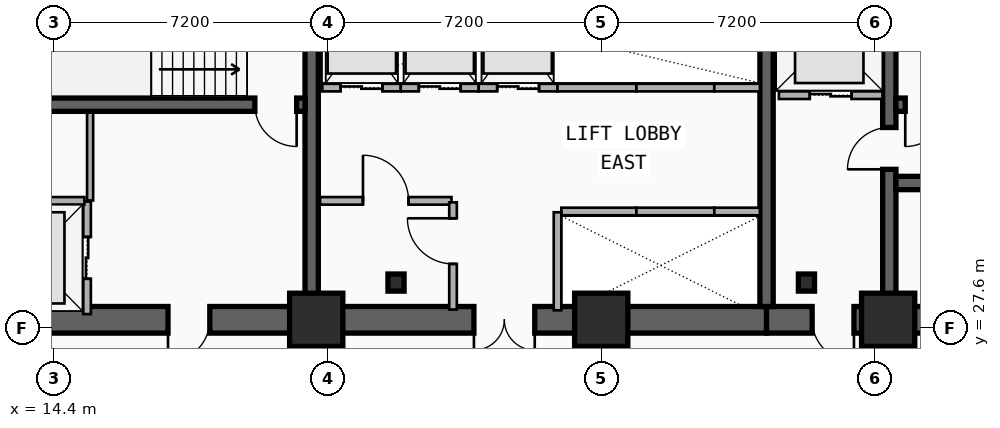
"""IFC4 building model, lengths in metres.
Left out: names, types, materials, properties, quantities, classifications, styles, units other than length and angle.
Written with IfcOpenShell. Run it as: python <this file> out.ifc"""

import sys

from ifc_helpers import new_model, si_unit, direction, frame, frame_2d, origin, origin_2d, place, context, subcontext, project, spatial, rectangle, i_section, extrude, element, fill, save


model = new_model("IFC4")
c1 = context("Model", 3, precision=1e-05, world=origin(), true_north=direction((0.0, 1.0)))
c2 = subcontext(c1, "Body", "Model", "MODEL_VIEW")
j1 = project(units=[si_unit("LENGTHUNIT", "METRE"), si_unit("PLANEANGLEUNIT", "RADIAN")], contexts=[c1])
p1 = place(None, origin())
s1 = spatial("IfcSite", under=j1, at=p1, CompositionType="ELEMENT")
p2 = place(p1, origin())
s2 = spatial("IfcBuilding", under=s1, at=p2, CompositionType="ELEMENT")
p3 = place(p2, frame((0.0, 0.0, 60.5)))
s3 = spatial("IfcBuildingStorey", under=s2, at=p3, CompositionType="ELEMENT", Elevation=60.5)
p4 = place(p3, frame((21.18, 27.82, 0.0), z_axis=(0.0, 0.0, 1.0), x_axis=(-1.0, 0.0, 0.0)))
e1 = element("IfcWall", 1, at=p4, inside=s3, PredefinedType="SHEAR", context=c2, shape_type="SweptSolid", body=[
    extrude(rectangle(XDim=9.03, YDim=0.7, at=frame_2d((4.515, 0.0))), origin(), (0.0, 0.0, 1.0), 3.5),
])
p5 = place(p4, frame((2.68, 0.0, 0.0)))
e2 = element("IfcOpeningElement", 2, at=p5, cuts=e1, PredefinedType="OPENING", context=c2, shape_type="SweptSolid", body=[
    extrude(rectangle(XDim=1.1, YDim=2.15, at=frame_2d((0.55, 1.075))), frame((0.0, 0.36, 0.0), z_axis=(0.0, -1.0, 0.0), x_axis=(1.0, 0.0, 0.0)), (0.0, 0.0, 1.0), 0.72),
])
p6 = place(p3, frame((33.15, 27.82, 0.0), z_axis=(0.0, 0.0, 1.0), x_axis=(-1.0, 0.0, 0.0)))
e3 = element("IfcWall", 3, at=p6, inside=s3, PredefinedType="SHEAR", context=c2, shape_type="SweptSolid", body=[
    extrude(rectangle(XDim=11.97, YDim=0.7, at=frame_2d((5.985, 0.0))), origin(), (0.0, 0.0, 1.0), 3.5),
])
p7 = place(p6, frame((6.1, 0.0, 0.0)))
e4 = element("IfcOpeningElement", 4, at=p7, cuts=e3, PredefinedType="OPENING", context=c2, shape_type="SweptSolid", body=[
    extrude(rectangle(XDim=1.6, YDim=2.2, at=frame_2d((0.8, 1.1))), frame((0.0, 0.36, 0.0), z_axis=(0.0, -1.0, 0.0), x_axis=(1.0, 0.0, 0.0)), (0.0, 0.0, 1.0), 0.72),
])
p8 = place(p3, frame((45.38, 27.82, 0.0), z_axis=(0.0, 0.0, 1.0), x_axis=(-1.0, 0.0, 0.0)))
e5 = element("IfcWall", 5, at=p8, inside=s3, PredefinedType="SHEAR", context=c2, shape_type="SweptSolid", body=[
    extrude(rectangle(XDim=12.23, YDim=0.7, at=frame_2d((6.115, 0.0))), origin(), (0.0, 0.0, 1.0), 3.5),
])
p9 = place(p8, frame((9.93, 0.0, 0.0)))
e6 = element("IfcOpeningElement", 6, at=p9, cuts=e5, PredefinedType="OPENING", context=c2, shape_type="SweptSolid", body=[
    extrude(rectangle(XDim=1.1, YDim=2.15, at=frame_2d((0.55, 1.075))), frame((0.0, 0.36, 0.0), z_axis=(0.0, -1.0, 0.0), x_axis=(1.0, 0.0, 0.0)), (0.0, 0.0, 1.0), 0.72),
])
p10 = place(p8, frame((6.23, 0.0, 0.0)))
e7 = element("IfcOpeningElement", 7, at=p10, cuts=e5, PredefinedType="OPENING", context=c2, shape_type="SweptSolid", body=[
    extrude(rectangle(XDim=1.1, YDim=2.15, at=frame_2d((0.55, 1.075))), frame((0.0, 0.36, 0.0), z_axis=(0.0, -1.0, 0.0), x_axis=(1.0, 0.0, 0.0)), (0.0, 0.0, 1.0), 0.72),
])
for number, where, z_axis, x_axis in (
    (8, (21.18, 28.17, 0.0), (0.0, 0.0, 1.0), (0.0, 1.0, 0.0)),
    (9, (33.15, 28.17, 0.0), (0.0, 0.0, 1.0), (0.0, 1.0, 0.0)),
):
    element("IfcWall", number, at=place(p3, frame(where, z_axis=z_axis, x_axis=x_axis)), inside=s3, PredefinedType="SHEAR", context=c2, shape_type="SweptSolid", body=[
        extrude(rectangle(XDim=8.53, YDim=0.35, at=frame_2d((4.265, 0.0))), origin(), (0.0, 0.0, 1.0), 3.5),
    ])
p11 = place(p3, frame((36.38, 28.17, 0.0), z_axis=(0.0, 0.0, 1.0), x_axis=(0.0, 1.0, 0.0)))
e10 = element("IfcWall", 10, at=p11, inside=s3, PredefinedType="SHEAR", context=c2, shape_type="SweptSolid", body=[
    extrude(rectangle(XDim=8.53, YDim=0.35, at=frame_2d((4.265, 0.0))), origin(), (0.0, 0.0, 1.0), 3.5),
])
p12 = place(p11, frame((3.61, 0.0, 0.0)))
e11 = element("IfcOpeningElement", 11, at=p12, cuts=e10, PredefinedType="OPENING", context=c2, shape_type="SweptSolid", body=[
    extrude(rectangle(XDim=1.1, YDim=2.15, at=frame_2d((0.55, 1.075))), frame((0.0, 0.185, 0.0), z_axis=(0.0, -1.0, 0.0), x_axis=(1.0, 0.0, 0.0)), (0.0, 0.0, 1.0), 0.37),
])
p13 = place(p3, frame((21.005, 33.48, 0.0), z_axis=(0.0, 0.0, 1.0), x_axis=(-1.0, 0.0, 0.0)))
e12 = element("IfcWall", 12, at=p13, inside=s3, PredefinedType="SHEAR", context=c2, shape_type="SweptSolid", body=[
    extrude(rectangle(XDim=8.505, YDim=0.35, at=frame_2d((4.252, 0.0))), origin(), (0.0, 0.0, 1.0), 3.5),
])
p14 = place(p13, frame((0.22, 0.0, 0.0)))
e13 = element("IfcOpeningElement", 13, at=p14, cuts=e12, PredefinedType="OPENING", context=c2, shape_type="SweptSolid", body=[
    extrude(rectangle(XDim=1.1, YDim=2.15, at=frame_2d((0.55, 1.075))), frame((0.0, 0.185, 0.0), z_axis=(0.0, -1.0, 0.0), x_axis=(1.0, 0.0, 0.0)), (0.0, 0.0, 1.0), 0.37),
])
p15 = place(p3, frame((45.03, 33.48, 0.0), z_axis=(0.0, 0.0, 1.0), x_axis=(-1.0, 0.0, 0.0)))
e14 = element("IfcWall", 14, at=p15, inside=s3, PredefinedType="SHEAR", context=c2, shape_type="SweptSolid", body=[
    extrude(rectangle(XDim=8.475, YDim=0.35, at=frame_2d((4.238, 0.0))), origin(), (0.0, 0.0, 1.0), 3.5),
])
p16 = place(p15, frame((7.13, 0.0, 0.0)))
e15 = element("IfcOpeningElement", 15, at=p16, cuts=e14, PredefinedType="OPENING", context=c2, shape_type="SweptSolid", body=[
    extrude(rectangle(XDim=1.1, YDim=2.15, at=frame_2d((0.55, 1.075))), frame((0.0, 0.185, 0.0), z_axis=(0.0, -1.0, 0.0), x_axis=(1.0, 0.0, 0.0)), (0.0, 0.0, 1.0), 0.37),
])
p17 = place(p3, frame((36.555, 31.42, 0.0), z_axis=(0.0, 0.0, 1.0), x_axis=(1.0, 0.0, 0.0)))
e16 = element("IfcWall", 16, at=p17, inside=s3, PredefinedType="SHEAR", context=c2, shape_type="SweptSolid", body=[
    extrude(rectangle(XDim=8.475, YDim=0.35, at=frame_2d((4.238, 0.0))), origin(), (0.0, 0.0, 1.0), 3.5),
])
for number, where, z_axis, x_axis in (
    (17, (23.4, 28.8, 0.0), (0.0, 0.0, 1.0), (1.0, 0.0, 0.0)),
    (18, (34.2, 28.8, 0.0), (0.0, 0.0, 1.0), (1.0, 0.0, 0.0)),
):
    element("IfcColumn", number, at=place(p3, frame(where, z_axis=z_axis, x_axis=x_axis)), inside=s3, PredefinedType="COLUMN", context=c2, shape_type="SweptSolid", body=[
        extrude(i_section(OverallWidth=0.424, OverallDepth=0.45, WebThickness=0.041, FlangeThickness=0.065, FilletRadius=0.015, at=origin_2d()), origin(), (0.0, 0.0, 1.0), 3.5),
    ])
for number, where, z_axis, x_axis in (
    (19, (21.3, 27.82, 0.0), (0.0, 0.0, 1.0), (1.0, 0.0, 0.0)),
    (20, (28.8, 27.82, 0.0), (0.0, 0.0, 1.0), (1.0, 0.0, 0.0)),
    (21, (36.35, 27.82, 0.0), (0.0, 0.0, 1.0), (1.0, 0.0, 0.0)),
):
    element("IfcColumn", number, at=place(p3, frame(where, z_axis=z_axis, x_axis=x_axis)), inside=s3, PredefinedType="COLUMN", context=c2, shape_type="SweptSolid", body=[
        extrude(rectangle(XDim=1.4, YDim=1.4, at=origin_2d()), origin(), (0.0, 0.0, 1.0), 3.5),
    ])
p18 = place(p3, frame((15.27, 27.97, 0.0), z_axis=(0.0, 0.0, 1.0), x_axis=(0.0, 1.0, 0.0)))
e22 = element("IfcWall", 22, at=p18, inside=s3, PredefinedType="PARTITIONING", context=c2, shape_type="SweptSolid", body=[
    extrude(rectangle(XDim=2.96, YDim=0.2, at=frame_2d((1.48, 0.0))), origin(), (0.0, 0.0, 1.0), 2.212),
])
p19 = place(p18, frame((0.93, 0.0, 0.0)))
e23 = element("IfcOpeningElement", 23, at=p19, cuts=e22, PredefinedType="OPENING", context=c2, shape_type="SweptSolid", body=[
    extrude(rectangle(XDim=1.1, YDim=2.15, at=frame_2d((0.55, 1.075))), frame((0.0, 0.11, 0.0), z_axis=(0.0, -1.0, 0.0), x_axis=(1.0, 0.0, 0.0)), (0.0, 0.0, 1.0), 0.22),
])
p20 = place(p3, frame((12.45, 30.95, 0.0), z_axis=(0.0, 0.0, 1.0), x_axis=(1.0, 0.0, 0.0)))
e24 = element("IfcWall", 24, at=p20, inside=s3, PredefinedType="PARTITIONING", context=c2, shape_type="SweptSolid", body=[
    extrude(rectangle(XDim=2.75, YDim=0.2, at=frame_2d((1.375, 0.0))), origin(), (0.0, 0.0, 1.0), 2.212),
])
p21 = place(p3, frame((33.475, 33.73, 0.0), z_axis=(0.0, 0.0, 1.0), x_axis=(1.0, 0.0, 0.0)))
e25 = element("IfcWall", 25, at=p21, inside=s3, PredefinedType="PARTITIONING", context=c2, shape_type="SweptSolid", body=[
    extrude(rectangle(XDim=2.725, YDim=0.2, at=frame_2d((1.362, 0.0))), origin(), (0.0, 0.0, 1.0), 2.212),
])
p22 = place(p21, frame((0.812, 0.0, 0.0)))
e26 = element("IfcOpeningElement", 26, at=p22, cuts=e25, PredefinedType="OPENING", context=c2, shape_type="SweptSolid", body=[
    extrude(rectangle(XDim=1.1, YDim=2.15, at=frame_2d((0.55, 1.075))), frame((0.0, 0.11, 0.0), z_axis=(0.0, -1.0, 0.0), x_axis=(1.0, 0.0, 0.0)), (0.0, 0.0, 1.0), 0.22),
])
p23 = place(p3, frame((27.75, 30.67, 0.0), z_axis=(0.0, 0.0, 1.0), x_axis=(1.0, 0.0, 0.0)))
e27 = element("IfcWall", 27, at=p23, inside=s3, PredefinedType="PARTITIONING", context=c2, shape_type="SweptSolid", body=[
    extrude(rectangle(XDim=1.975, YDim=0.2, at=frame_2d((0.988, 0.0))), origin(), (0.0, 0.0, 1.0), 2.212),
])
p24 = place(p3, frame((27.65, 28.07, 0.0), z_axis=(0.0, 0.0, 1.0), x_axis=(0.0, 1.0, 0.0)))
e28 = element("IfcWall", 28, at=p24, inside=s3, PredefinedType="PARTITIONING", context=c2, shape_type="SweptSolid", body=[
    extrude(rectangle(XDim=2.58, YDim=0.2, at=frame_2d((1.29, 0.0))), origin(), (0.0, 0.0, 1.0), 2.212),
])
p25 = place(p3, frame((29.725, 30.67, 0.0), z_axis=(0.0, 0.0, 1.0), x_axis=(1.0, 0.0, 0.0)))
e29 = element("IfcWall", 29, at=p25, inside=s3, PredefinedType="PARTITIONING", context=c2, shape_type="SweptSolid", body=[
    extrude(rectangle(XDim=2.05, YDim=0.2, at=frame_2d((1.025, 0.0))), origin(), (0.0, 0.0, 1.0), 2.62),
])
p26 = place(p3, frame((31.775, 30.67, 0.0), z_axis=(0.0, 0.0, 1.0), x_axis=(1.0, 0.0, 0.0)))
e30 = element("IfcWall", 30, at=p26, inside=s3, PredefinedType="PARTITIONING", context=c2, shape_type="SweptSolid", body=[
    extrude(rectangle(XDim=1.2, YDim=0.2, at=frame_2d((0.6, 0.0))), origin(), (0.0, 0.0, 1.0), 2.62),
])
p27 = place(p3, frame((21.46, 33.93, 0.0), z_axis=(0.0, 0.0, 1.0), x_axis=(1.0, 0.0, 0.0)))
e31 = element("IfcWall", 31, at=p27, inside=s3, PredefinedType="PARTITIONING", context=c2, shape_type="SweptSolid", body=[
    extrude(rectangle(XDim=2.065, YDim=0.2, at=frame_2d((1.032, 0.0))), origin(), (0.0, 0.0, 1.0), 2.212),
])
p28 = place(p27, frame((0.482, 0.0, 0.0)))
e32 = element("IfcOpeningElement", 32, at=p28, cuts=e31, PredefinedType="OPENING", context=c2, shape_type="SweptSolid", body=[
    extrude(rectangle(XDim=1.1, YDim=2.15, at=frame_2d((0.55, 1.075))), frame((0.0, 0.11, 0.0), z_axis=(0.0, -1.0, 0.0), x_axis=(1.0, 0.0, 0.0)), (0.0, 0.0, 1.0), 0.22),
])
p29 = place(p3, frame((23.525, 33.93, 0.0), z_axis=(0.0, 0.0, 1.0), x_axis=(1.0, 0.0, 0.0)))
e33 = element("IfcWall", 33, at=p29, inside=s3, PredefinedType="PARTITIONING", context=c2, shape_type="SweptSolid", body=[
    extrude(rectangle(XDim=2.05, YDim=0.2, at=frame_2d((1.025, 0.0))), origin(), (0.0, 0.0, 1.0), 3.24),
])
p30 = place(p29, frame((0.475, 0.0, 0.0)))
e34 = element("IfcOpeningElement", 34, at=p30, cuts=e33, PredefinedType="OPENING", context=c2, shape_type="SweptSolid", body=[
    extrude(rectangle(XDim=1.1, YDim=2.15, at=frame_2d((0.55, 1.075))), frame((0.0, 0.11, 0.0), z_axis=(0.0, -1.0, 0.0), x_axis=(1.0, 0.0, 0.0)), (0.0, 0.0, 1.0), 0.22),
])
p31 = place(p3, frame((25.575, 33.93, 0.0), z_axis=(0.0, 0.0, 1.0), x_axis=(1.0, 0.0, 0.0)))
e35 = element("IfcWall", 35, at=p31, inside=s3, PredefinedType="PARTITIONING", context=c2, shape_type="SweptSolid", body=[
    extrude(rectangle(XDim=2.075, YDim=0.2, at=frame_2d((1.038, 0.0))), origin(), (0.0, 0.0, 1.0), 3.24),
])
p32 = place(p31, frame((0.488, 0.0, 0.0)))
e36 = element("IfcOpeningElement", 36, at=p32, cuts=e35, PredefinedType="OPENING", context=c2, shape_type="SweptSolid", body=[
    extrude(rectangle(XDim=1.1, YDim=2.15, at=frame_2d((0.55, 1.075))), frame((0.0, 0.11, 0.0), z_axis=(0.0, -1.0, 0.0), x_axis=(1.0, 0.0, 0.0)), (0.0, 0.0, 1.0), 0.22),
])
p33 = place(p3, frame((27.65, 33.93, 0.0), z_axis=(0.0, 0.0, 1.0), x_axis=(1.0, 0.0, 0.0)))
e37 = element("IfcWall", 37, at=p33, inside=s3, PredefinedType="PARTITIONING", context=c2, shape_type="SweptSolid", body=[
    extrude(rectangle(XDim=2.075, YDim=0.2, at=frame_2d((1.038, 0.0))), origin(), (0.0, 0.0, 1.0), 2.212),
])
p34 = place(p3, frame((29.725, 33.93, 0.0), z_axis=(0.0, 0.0, 1.0), x_axis=(1.0, 0.0, 0.0)))
e38 = element("IfcWall", 38, at=p34, inside=s3, PredefinedType="PARTITIONING", context=c2, shape_type="SweptSolid", body=[
    extrude(rectangle(XDim=2.05, YDim=0.2, at=frame_2d((1.025, 0.0))), origin(), (0.0, 0.0, 1.0), 3.24),
])
p35 = place(p3, frame((31.775, 33.93, 0.0), z_axis=(0.0, 0.0, 1.0), x_axis=(1.0, 0.0, 0.0)))
e39 = element("IfcWall", 39, at=p35, inside=s3, PredefinedType="PARTITIONING", context=c2, shape_type="SweptSolid", body=[
    extrude(rectangle(XDim=1.2, YDim=0.2, at=frame_2d((0.6, 0.0))), origin(), (0.0, 0.0, 1.0), 3.24),
])
p36 = place(p3, frame((21.4, 30.95, 0.0), z_axis=(0.0, 0.0, 1.0), x_axis=(1.0, 0.0, 0.0)))
e40 = element("IfcWall", 40, at=p36, inside=s3, PredefinedType="PARTITIONING", context=c2, shape_type="SweptSolid", body=[
    extrude(rectangle(XDim=3.46, YDim=0.2, at=frame_2d((1.73, 0.0))), origin(), (0.0, 0.0, 1.0), 2.28),
])
p37 = place(p36, frame((1.13, 0.0, 0.0)))
e41 = element("IfcOpeningElement", 41, at=p37, cuts=e40, PredefinedType="OPENING", context=c2, shape_type="SweptSolid", body=[
    extrude(rectangle(XDim=1.2, YDim=2.15, at=frame_2d((0.6, 1.075))), frame((0.0, 0.11, 0.0), z_axis=(0.0, -1.0, 0.0), x_axis=(1.0, 0.0, 0.0)), (0.0, 0.0, 1.0), 0.22),
])
p38 = place(p3, frame((24.9, 28.09, 0.0), z_axis=(0.0, 0.0, 1.0), x_axis=(0.0, 1.0, 0.0)))
e42 = element("IfcWall", 42, at=p38, inside=s3, PredefinedType="PARTITIONING", context=c2, shape_type="SweptSolid", body=[
    extrude(rectangle(XDim=2.82, YDim=0.2, at=frame_2d((1.41, 0.0))), origin(), (0.0, 0.0, 1.0), 2.62),
])
p39 = place(p38, frame((1.201, 0.0, 0.0)))
e43 = element("IfcOpeningElement", 43, at=p39, cuts=e42, PredefinedType="OPENING", context=c2, shape_type="SweptSolid", body=[
    extrude(rectangle(XDim=1.2, YDim=2.15, at=frame_2d((0.6, 1.075))), frame((0.0, 0.11, 0.0), z_axis=(0.0, -1.0, 0.0), x_axis=(1.0, 0.0, 0.0)), (0.0, 0.0, 1.0), 0.22),
])
p40 = place(p3, frame((15.35, 30.96, 0.0), z_axis=(0.0, 0.0, 1.0), x_axis=(0.0, 1.0, 0.0)))
e44 = element("IfcWall", 44, at=p40, inside=s3, PredefinedType="PARTITIONING", context=c2, shape_type="SweptSolid", body=[
    extrude(rectangle(XDim=2.31, YDim=0.16, at=frame_2d((1.155, 0.0))), origin(), (0.0, 0.0, 1.0), 3.24),
])
p41 = place(p19, origin())
e45 = element("IfcDoor", 45, at=p41, inside=s3, OperationType="DOUBLE_DOOR_SLIDING", PredefinedType="DOOR", context=c2, shape_type="SweptSolid", body=[
    extrude(rectangle(XDim=1.1, YDim=2.15, at=frame_2d((0.55, 1.075))), frame((0.0, 0.025, 0.0), z_axis=(0.0, -1.0, 0.0), x_axis=(1.0, 0.0, 0.0)), (0.0, 0.0, 1.0), 0.05),
])
fill(e23, e45)
p42 = place(p22, origin())
e46 = element("IfcDoor", 46, at=p42, inside=s3, OperationType="DOUBLE_DOOR_SLIDING", PredefinedType="DOOR", context=c2, shape_type="SweptSolid", body=[
    extrude(rectangle(XDim=1.1, YDim=2.15, at=frame_2d((0.55, 1.075))), frame((0.0, 0.025, 0.0), z_axis=(0.0, -1.0, 0.0), x_axis=(1.0, 0.0, 0.0)), (0.0, 0.0, 1.0), 0.05),
])
fill(e26, e46)
p43 = place(p28, origin())
e47 = element("IfcDoor", 47, at=p43, inside=s3, OperationType="DOUBLE_DOOR_SLIDING", PredefinedType="DOOR", context=c2, shape_type="SweptSolid", body=[
    extrude(rectangle(XDim=1.1, YDim=2.15, at=frame_2d((0.55, 1.075))), frame((0.0, 0.025, 0.0), z_axis=(0.0, -1.0, 0.0), x_axis=(1.0, 0.0, 0.0)), (0.0, 0.0, 1.0), 0.05),
])
fill(e32, e47)
p44 = place(p30, origin())
e48 = element("IfcDoor", 48, at=p44, inside=s3, OperationType="DOUBLE_DOOR_SLIDING", PredefinedType="DOOR", context=c2, shape_type="SweptSolid", body=[
    extrude(rectangle(XDim=1.1, YDim=2.15, at=frame_2d((0.55, 1.075))), frame((0.0, 0.025, 0.0), z_axis=(0.0, -1.0, 0.0), x_axis=(1.0, 0.0, 0.0)), (0.0, 0.0, 1.0), 0.05),
])
fill(e34, e48)
p45 = place(p32, origin())
e49 = element("IfcDoor", 49, at=p45, inside=s3, OperationType="DOUBLE_DOOR_SLIDING", PredefinedType="DOOR", context=c2, shape_type="SweptSolid", body=[
    extrude(rectangle(XDim=1.1, YDim=2.15, at=frame_2d((0.55, 1.075))), frame((0.0, 0.025, 0.0), z_axis=(0.0, -1.0, 0.0), x_axis=(1.0, 0.0, 0.0)), (0.0, 0.0, 1.0), 0.05),
])
fill(e36, e49)
p46 = place(p14, origin())
e50 = element("IfcDoor", 50, at=p46, inside=s3, OperationType="SINGLE_SWING_LEFT", PredefinedType="DOOR", context=c2, shape_type="SweptSolid", body=[
    extrude(rectangle(XDim=1.1, YDim=2.15, at=frame_2d((0.55, 1.075))), frame((0.0, 0.025, 0.0), z_axis=(0.0, -1.0, 0.0), x_axis=(1.0, 0.0, 0.0)), (0.0, 0.0, 1.0), 0.05),
])
fill(e13, e50)
p47 = place(p5, origin())
e51 = element("IfcDoor", 51, at=p47, inside=s3, OperationType="SINGLE_SWING_RIGHT", PredefinedType="DOOR", context=c2, shape_type="SweptSolid", body=[
    extrude(rectangle(XDim=1.1, YDim=2.15, at=frame_2d((0.55, 1.075))), frame((0.0, 0.025, 0.0), z_axis=(0.0, -1.0, 0.0), x_axis=(1.0, 0.0, 0.0)), (0.0, 0.0, 1.0), 0.05),
])
fill(e2, e51)
p48 = place(p16, origin())
e52 = element("IfcDoor", 52, at=p48, inside=s3, OperationType="SINGLE_SWING_RIGHT", PredefinedType="DOOR", context=c2, shape_type="SweptSolid", body=[
    extrude(rectangle(XDim=1.1, YDim=2.15, at=frame_2d((0.55, 1.075))), frame((0.0, 0.025, 0.0), z_axis=(0.0, -1.0, 0.0), x_axis=(1.0, 0.0, 0.0)), (0.0, 0.0, 1.0), 0.05),
])
fill(e15, e52)
p49 = place(p12, origin())
e53 = element("IfcDoor", 53, at=p49, inside=s3, OperationType="SINGLE_SWING_LEFT", PredefinedType="DOOR", context=c2, shape_type="SweptSolid", body=[
    extrude(rectangle(XDim=1.1, YDim=2.15, at=frame_2d((0.55, 1.075))), frame((0.0, 0.025, 0.0), z_axis=(0.0, -1.0, 0.0), x_axis=(1.0, 0.0, 0.0)), (0.0, 0.0, 1.0), 0.05),
])
fill(e11, e53)
p50 = place(p9, origin())
e54 = element("IfcDoor", 54, at=p50, inside=s3, OperationType="SINGLE_SWING_LEFT", PredefinedType="DOOR", context=c2, shape_type="SweptSolid", body=[
    extrude(rectangle(XDim=1.1, YDim=2.15, at=frame_2d((0.55, 1.075))), frame((0.0, 0.025, 0.0), z_axis=(0.0, -1.0, 0.0), x_axis=(1.0, 0.0, 0.0)), (0.0, 0.0, 1.0), 0.05),
])
fill(e6, e54)
p51 = place(p7, origin())
e55 = element("IfcDoor", 55, at=p51, inside=s3, OperationType="SINGLE_SWING_LEFT", PredefinedType="DOOR", context=c2, shape_type="SweptSolid", body=[
    extrude(rectangle(XDim=1.6, YDim=2.2, at=frame_2d((0.8, 1.1))), frame((0.0, 0.025, 0.0), z_axis=(0.0, -1.0, 0.0), x_axis=(1.0, 0.0, 0.0)), (0.0, 0.0, 1.0), 0.05),
])
fill(e4, e55)
p52 = place(p37, origin())
e56 = element("IfcDoor", 56, at=p52, inside=s3, OperationType="SINGLE_SWING_LEFT", PredefinedType="DOOR", context=c2, shape_type="SweptSolid", body=[
    extrude(rectangle(XDim=1.2, YDim=2.15, at=frame_2d((0.6, 1.075))), frame((0.0, 0.025, 0.0), z_axis=(0.0, -1.0, 0.0), x_axis=(1.0, 0.0, 0.0)), (0.0, 0.0, 1.0), 0.05),
])
fill(e41, e56)
p53 = place(p39, origin())
e57 = element("IfcDoor", 57, at=p53, inside=s3, OperationType="SINGLE_SWING_RIGHT", PredefinedType="DOOR", context=c2, shape_type="SweptSolid", body=[
    extrude(rectangle(XDim=1.2, YDim=2.15, at=frame_2d((0.6, 1.075))), frame((0.0, 0.025, 0.0), z_axis=(0.0, -1.0, 0.0), x_axis=(1.0, 0.0, 0.0)), (0.0, 0.0, 1.0), 0.05),
])
fill(e43, e57)
save(model, sys.argv[1])
